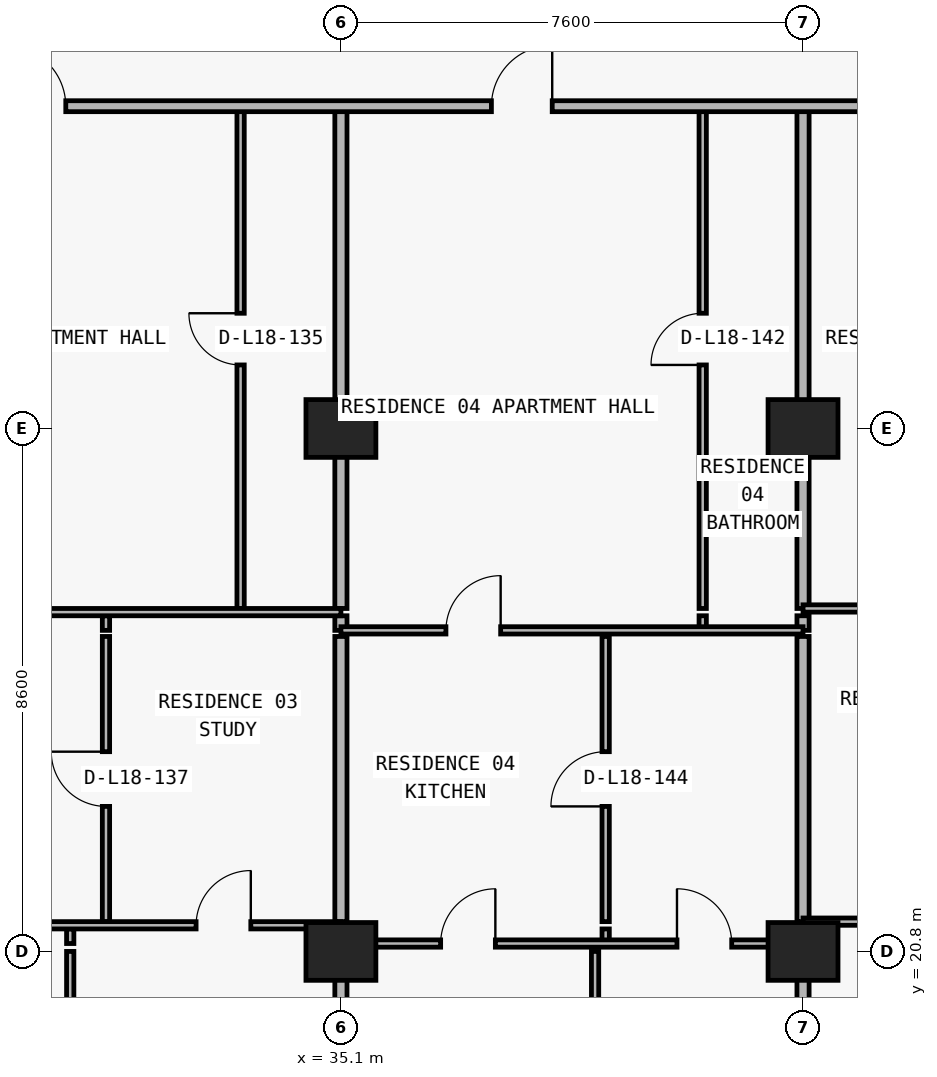
"""IFC4 building model, lengths in metres.
Left out: names, types, materials, properties, quantities, classifications, styles, units other than length and angle.
Written with IfcOpenShell. Run it as: python <this file> out.ifc"""

import sys

from ifc_helpers import new_model, si_unit, direction, frame, frame_2d, origin, origin_2d, place, context, subcontext, project, spatial, rectangle, extrude, element, fill, save


model = new_model("IFC4")
c1 = context("Model", 3, precision=1e-05, world=origin(), true_north=direction((0.0, 1.0)))
c2 = subcontext(c1, "Body", "Model", "MODEL_VIEW")
j1 = project(units=[si_unit("LENGTHUNIT", "METRE"), si_unit("PLANEANGLEUNIT", "RADIAN")], contexts=[c1])
p1 = place(None, origin())
s1 = spatial("IfcSite", under=j1, at=p1, CompositionType="ELEMENT")
p2 = place(p1, origin())
s2 = spatial("IfcBuilding", under=s1, at=p2, CompositionType="ELEMENT")
p3 = place(p2, frame((0.0, 0.0, 69.6)))
s3 = spatial("IfcBuildingStorey", under=s2, at=p3, CompositionType="ELEMENT", Elevation=69.6)
for number, where, z_axis, x_axis in (
    (1, (35.1, 20.8, 0.0), (0.0, 0.0, 1.0), (1.0, 0.0, 0.0)),
    (2, (42.7, 20.8, 0.0), (0.0, 0.0, 1.0), (1.0, 0.0, 0.0)),
    (3, (35.1, 29.4, 0.0), (0.0, 0.0, 1.0), (1.0, 0.0, 0.0)),
    (4, (42.7, 29.4, 0.0), (0.0, 0.0, 1.0), (1.0, 0.0, 0.0)),
):
    element("IfcColumn", number, at=place(p3, frame(where, z_axis=z_axis, x_axis=x_axis)), inside=s3, PredefinedType="COLUMN", context=c2, shape_type="SweptSolid", body=[
        extrude(rectangle(XDim=1.15, YDim=0.95, at=origin_2d()), origin(), (0.0, 0.0, 1.0), 3.05),
    ])
p4 = place(p3, frame((30.648, 6.24, 0.0), z_axis=(0.0, 0.0, 1.0), x_axis=(0.0, 1.0, 0.0)))
e5 = element("IfcWall", 5, at=p4, inside=s3, PredefinedType="PARTITIONING", context=c2, shape_type="SweptSolid", body=[
    extrude(rectangle(XDim=14.56, YDim=0.12, at=frame_2d((7.28, 0.0))), origin(), (0.0, 0.0, 1.0), 3.05),
])
p5 = place(p3, frame((30.648, 20.93, 0.0), z_axis=(0.0, 0.0, 1.0), x_axis=(0.0, 1.0, 0.0)))
e6 = element("IfcWall", 6, at=p5, inside=s3, PredefinedType="PARTITIONING", context=c2, shape_type="SweptSolid", body=[
    extrude(rectangle(XDim=0.24, YDim=0.12, at=frame_2d((0.12, 0.0))), origin(), (0.0, 0.0, 1.0), 3.05),
])
p6 = place(p3, frame((31.236, 21.29, 0.0), z_axis=(0.0, 0.0, 1.0), x_axis=(0.0, 1.0, 0.0)))
e7 = element("IfcWall", 7, at=p6, inside=s3, PredefinedType="PARTITIONING", context=c2, shape_type="SweptSolid", body=[
    extrude(rectangle(XDim=4.69, YDim=0.12, at=frame_2d((2.345, 0.0))), origin(), (0.0, 0.0, 1.0), 3.05),
])
p7 = place(p6, frame((1.895, 0.0, 0.0)))
e8 = element("IfcOpeningElement", 8, at=p7, cuts=e7, PredefinedType="OPENING", context=c2, shape_type="SweptSolid", body=[
    extrude(rectangle(XDim=0.9, YDim=2.15, at=frame_2d((0.45, 1.075))), frame((0.0, 0.07, 0.0), z_axis=(0.0, -1.0, 0.0), x_axis=(1.0, 0.0, 0.0)), (0.0, 0.0, 1.0), 0.14),
])
p8 = place(p3, frame((31.236, 26.08, 0.0), z_axis=(0.0, 0.0, 1.0), x_axis=(0.0, 1.0, 0.0)))
e9 = element("IfcWall", 9, at=p8, inside=s3, PredefinedType="PARTITIONING", context=c2, shape_type="SweptSolid", body=[
    extrude(rectangle(XDim=0.24, YDim=0.12, at=frame_2d((0.12, 0.0))), origin(), (0.0, 0.0, 1.0), 3.05),
])
p9 = place(p3, frame((33.45, 26.44, 0.0), z_axis=(0.0, 0.0, 1.0), x_axis=(0.0, 1.0, 0.0)))
e10 = element("IfcWall", 10, at=p9, inside=s3, PredefinedType="PARTITIONING", context=c2, shape_type="SweptSolid", body=[
    extrude(rectangle(XDim=8.26, YDim=0.12, at=frame_2d((4.13, 0.0))), origin(), (0.0, 0.0, 1.0), 3.05),
])
p10 = place(p9, frame((4.005, 0.0, 0.0)))
e11 = element("IfcOpeningElement", 11, at=p10, cuts=e10, PredefinedType="OPENING", context=c2, shape_type="SweptSolid", body=[
    extrude(rectangle(XDim=0.85, YDim=2.1, at=frame_2d((0.425, 1.05))), frame((0.0, 0.07, 0.0), z_axis=(0.0, -1.0, 0.0), x_axis=(1.0, 0.0, 0.0)), (0.0, 0.0, 1.0), 0.14),
])
p11 = place(p3, frame((35.1, 6.24, 0.0), z_axis=(0.0, 0.0, 1.0), x_axis=(0.0, 1.0, 0.0)))
e12 = element("IfcWall", 12, at=p11, inside=s3, PredefinedType="PARTITIONING", context=c2, shape_type="SweptSolid", body=[
    extrude(rectangle(XDim=14.56, YDim=0.2, at=frame_2d((7.28, 0.0))), origin(), (0.0, 0.0, 1.0), 2.11),
])
p12 = place(p3, frame((35.1, 20.93, 0.0), z_axis=(0.0, 0.0, 1.0), x_axis=(0.0, 1.0, 0.0)))
e13 = element("IfcWall", 13, at=p12, inside=s3, PredefinedType="PARTITIONING", context=c2, shape_type="SweptSolid", body=[
    extrude(rectangle(XDim=0.24, YDim=0.2, at=frame_2d((0.12, 0.0))), origin(), (0.0, 0.0, 1.0), 3.05),
])
p13 = place(p3, frame((35.1, 21.29, 0.0), z_axis=(0.0, 0.0, 1.0), x_axis=(0.0, 1.0, 0.0)))
e14 = element("IfcWall", 14, at=p13, inside=s3, PredefinedType="PARTITIONING", context=c2, shape_type="SweptSolid", body=[
    extrude(rectangle(XDim=4.69, YDim=0.2, at=frame_2d((2.345, 0.0))), origin(), (0.0, 0.0, 1.0), 2.11),
])
p14 = place(p3, frame((35.1, 26.08, 0.0), z_axis=(0.0, 0.0, 1.0), x_axis=(0.0, 1.0, 0.0)))
e15 = element("IfcWall", 15, at=p14, inside=s3, PredefinedType="PARTITIONING", context=c2, shape_type="SweptSolid", body=[
    extrude(rectangle(XDim=0.24, YDim=0.2, at=frame_2d((0.12, 0.0))), origin(), (0.0, 0.0, 1.0), 2.11),
])
p15 = place(p3, frame((35.1, 26.44, 0.0), z_axis=(0.0, 0.0, 1.0), x_axis=(0.0, 1.0, 0.0)))
e16 = element("IfcWall", 16, at=p15, inside=s3, PredefinedType="PARTITIONING", context=c2, shape_type="SweptSolid", body=[
    extrude(rectangle(XDim=8.26, YDim=0.2, at=frame_2d((4.13, 0.0))), origin(), (0.0, 0.0, 1.0), 2.11),
])
p16 = place(p3, frame((39.28, 6.24, 0.0), z_axis=(0.0, 0.0, 1.0), x_axis=(0.0, 1.0, 0.0)))
e17 = element("IfcWall", 17, at=p16, inside=s3, PredefinedType="PARTITIONING", context=c2, shape_type="SweptSolid", body=[
    extrude(rectangle(XDim=14.56, YDim=0.12, at=frame_2d((7.28, 0.0))), origin(), (0.0, 0.0, 1.0), 3.05),
])
p17 = place(p3, frame((39.454, 20.93, 0.0), z_axis=(0.0, 0.0, 1.0), x_axis=(0.0, 1.0, 0.0)))
e18 = element("IfcWall", 18, at=p17, inside=s3, PredefinedType="PARTITIONING", context=c2, shape_type="SweptSolid", body=[
    extrude(rectangle(XDim=0.24, YDim=0.12, at=frame_2d((0.12, 0.0))), origin(), (0.0, 0.0, 1.0), 3.05),
])
p18 = place(p3, frame((39.454, 21.29, 0.0), z_axis=(0.0, 0.0, 1.0), x_axis=(0.0, 1.0, 0.0)))
e19 = element("IfcWall", 19, at=p18, inside=s3, PredefinedType="PARTITIONING", context=c2, shape_type="SweptSolid", body=[
    extrude(rectangle(XDim=4.69, YDim=0.12, at=frame_2d((2.345, 0.0))), origin(), (0.0, 0.0, 1.0), 3.05),
])
p19 = place(p18, frame((1.895, 0.0, 0.0)))
e20 = element("IfcOpeningElement", 20, at=p19, cuts=e19, PredefinedType="OPENING", context=c2, shape_type="SweptSolid", body=[
    extrude(rectangle(XDim=0.9, YDim=2.15, at=frame_2d((0.45, 1.075))), frame((0.0, 0.07, 0.0), z_axis=(0.0, -1.0, 0.0), x_axis=(1.0, 0.0, 0.0)), (0.0, 0.0, 1.0), 0.14),
])
p20 = place(p3, frame((41.05, 26.08, 0.0), z_axis=(0.0, 0.0, 1.0), x_axis=(0.0, 1.0, 0.0)))
e21 = element("IfcWall", 21, at=p20, inside=s3, PredefinedType="PARTITIONING", context=c2, shape_type="SweptSolid", body=[
    extrude(rectangle(XDim=0.24, YDim=0.12, at=frame_2d((0.12, 0.0))), origin(), (0.0, 0.0, 1.0), 3.05),
])
p21 = place(p3, frame((41.05, 26.44, 0.0), z_axis=(0.0, 0.0, 1.0), x_axis=(0.0, 1.0, 0.0)))
e22 = element("IfcWall", 22, at=p21, inside=s3, PredefinedType="PARTITIONING", context=c2, shape_type="SweptSolid", body=[
    extrude(rectangle(XDim=8.26, YDim=0.12, at=frame_2d((4.13, 0.0))), origin(), (0.0, 0.0, 1.0), 3.05),
])
p22 = place(p21, frame((4.005, 0.0, 0.0)))
e23 = element("IfcOpeningElement", 23, at=p22, cuts=e22, PredefinedType="OPENING", context=c2, shape_type="SweptSolid", body=[
    extrude(rectangle(XDim=0.85, YDim=2.1, at=frame_2d((0.425, 1.05))), frame((0.0, 0.07, 0.0), z_axis=(0.0, -1.0, 0.0), x_axis=(1.0, 0.0, 0.0)), (0.0, 0.0, 1.0), 0.14),
])
p23 = place(p3, frame((42.7, 6.24, 0.0), z_axis=(0.0, 0.0, 1.0), x_axis=(0.0, 1.0, 0.0)))
e24 = element("IfcWall", 24, at=p23, inside=s3, PredefinedType="PARTITIONING", context=c2, shape_type="SweptSolid", body=[
    extrude(rectangle(XDim=14.56, YDim=0.2, at=frame_2d((7.28, 0.0))), origin(), (0.0, 0.0, 1.0), 2.11),
])
p24 = place(p3, frame((42.7, 20.93, 0.0), z_axis=(0.0, 0.0, 1.0), x_axis=(0.0, 1.0, 0.0)))
e25 = element("IfcWall", 25, at=p24, inside=s3, PredefinedType="PARTITIONING", context=c2, shape_type="SweptSolid", body=[
    extrude(rectangle(XDim=0.24, YDim=0.2, at=frame_2d((0.12, 0.0))), origin(), (0.0, 0.0, 1.0), 3.05),
])
p25 = place(p3, frame((42.7, 21.29, 0.0), z_axis=(0.0, 0.0, 1.0), x_axis=(0.0, 1.0, 0.0)))
e26 = element("IfcWall", 26, at=p25, inside=s3, PredefinedType="PARTITIONING", context=c2, shape_type="SweptSolid", body=[
    extrude(rectangle(XDim=4.69, YDim=0.2, at=frame_2d((2.345, 0.0))), origin(), (0.0, 0.0, 1.0), 2.11),
])
p26 = place(p3, frame((42.7, 26.08, 0.0), z_axis=(0.0, 0.0, 1.0), x_axis=(0.0, 1.0, 0.0)))
e27 = element("IfcWall", 27, at=p26, inside=s3, PredefinedType="PARTITIONING", context=c2, shape_type="SweptSolid", body=[
    extrude(rectangle(XDim=0.24, YDim=0.2, at=frame_2d((0.12, 0.0))), origin(), (0.0, 0.0, 1.0), 2.11),
])
p27 = place(p3, frame((42.7, 26.44, 0.0), z_axis=(0.0, 0.0, 1.0), x_axis=(0.0, 1.0, 0.0)))
e28 = element("IfcWall", 28, at=p27, inside=s3, PredefinedType="PARTITIONING", context=c2, shape_type="SweptSolid", body=[
    extrude(rectangle(XDim=8.26, YDim=0.2, at=frame_2d((4.13, 0.0))), origin(), (0.0, 0.0, 1.0), 2.11),
])
p28 = place(p3, frame((35.1, 20.93, 0.0), z_axis=(0.0, 0.0, 1.0), x_axis=(1.0, 0.0, 0.0)))
e29 = element("IfcWall", 29, at=p28, inside=s3, PredefinedType="PARTITIONING", context=c2, shape_type="SweptSolid", body=[
    extrude(rectangle(XDim=7.6, YDim=0.12, at=frame_2d((3.8, 0.0))), origin(), (0.0, 0.0, 1.0), 2.11),
])
p29 = place(p28, frame((1.64, 0.0, 0.0)))
e30 = element("IfcOpeningElement", 30, at=p29, cuts=e29, PredefinedType="OPENING", context=c2, shape_type="SweptSolid", body=[
    extrude(rectangle(XDim=0.9, YDim=2.06, at=frame_2d((0.45, 1.03))), frame((0.0, 0.07, 0.0), z_axis=(0.0, -1.0, 0.0), x_axis=(1.0, 0.0, 0.0)), (0.0, 0.0, 1.0), 0.14),
])
p30 = place(p28, frame((5.527, 0.0, 0.0)))
e31 = element("IfcOpeningElement", 31, at=p30, cuts=e29, PredefinedType="OPENING", context=c2, shape_type="SweptSolid", body=[
    extrude(rectangle(XDim=0.9, YDim=2.06, at=frame_2d((0.45, 1.03))), frame((0.0, 0.07, 0.0), z_axis=(0.0, -1.0, 0.0), x_axis=(1.0, 0.0, 0.0)), (0.0, 0.0, 1.0), 0.14),
])
p31 = place(p3, frame((26.97, 21.23, 0.0), z_axis=(0.0, 0.0, 1.0), x_axis=(1.0, 0.0, 0.0)))
e32 = element("IfcWall", 32, at=p31, inside=s3, PredefinedType="PARTITIONING", context=c2, shape_type="SweptSolid", body=[
    extrude(rectangle(XDim=8.13, YDim=0.12, at=frame_2d((4.065, 0.0))), origin(), (0.0, 0.0, 1.0), 3.05),
])
p32 = place(p31, frame((1.389, 0.0, 0.0)))
e33 = element("IfcOpeningElement", 33, at=p32, cuts=e32, PredefinedType="OPENING", context=c2, shape_type="SweptSolid", body=[
    extrude(rectangle(XDim=0.9, YDim=2.15, at=frame_2d((0.45, 1.075))), frame((0.0, 0.07, 0.0), z_axis=(0.0, -1.0, 0.0), x_axis=(1.0, 0.0, 0.0)), (0.0, 0.0, 1.0), 0.14),
])
p33 = place(p31, frame((5.748, 0.0, 0.0)))
e34 = element("IfcOpeningElement", 34, at=p33, cuts=e32, PredefinedType="OPENING", context=c2, shape_type="SweptSolid", body=[
    extrude(rectangle(XDim=0.9, YDim=2.15, at=frame_2d((0.45, 1.075))), frame((0.0, 0.07, 0.0), z_axis=(0.0, -1.0, 0.0), x_axis=(1.0, 0.0, 0.0)), (0.0, 0.0, 1.0), 0.14),
])
p34 = place(p3, frame((42.7, 21.29, 0.0), z_axis=(0.0, 0.0, 1.0), x_axis=(1.0, 0.0, 0.0)))
e35 = element("IfcWall", 35, at=p34, inside=s3, PredefinedType="PARTITIONING", context=c2, shape_type="SweptSolid", body=[
    extrude(rectangle(XDim=8.13, YDim=0.12, at=frame_2d((4.065, 0.0))), origin(), (0.0, 0.0, 1.0), 3.05),
])
p35 = place(p34, frame((1.524, 0.0, 0.0)))
e36 = element("IfcOpeningElement", 36, at=p35, cuts=e35, PredefinedType="OPENING", context=c2, shape_type="SweptSolid", body=[
    extrude(rectangle(XDim=0.9, YDim=2.15, at=frame_2d((0.45, 1.075))), frame((0.0, 0.07, 0.0), z_axis=(0.0, -1.0, 0.0), x_axis=(1.0, 0.0, 0.0)), (0.0, 0.0, 1.0), 0.14),
])
p36 = place(p34, frame((5.758, 0.0, 0.0)))
e37 = element("IfcOpeningElement", 37, at=p36, cuts=e35, PredefinedType="OPENING", context=c2, shape_type="SweptSolid", body=[
    extrude(rectangle(XDim=0.9, YDim=2.15, at=frame_2d((0.45, 1.075))), frame((0.0, 0.07, 0.0), z_axis=(0.0, -1.0, 0.0), x_axis=(1.0, 0.0, 0.0)), (0.0, 0.0, 1.0), 0.14),
])
p37 = place(p3, frame((35.1, 26.08, 0.0), z_axis=(0.0, 0.0, 1.0), x_axis=(1.0, 0.0, 0.0)))
e38 = element("IfcWall", 38, at=p37, inside=s3, PredefinedType="PARTITIONING", context=c2, shape_type="SweptSolid", body=[
    extrude(rectangle(XDim=7.6, YDim=0.12, at=frame_2d((3.8, 0.0))), origin(), (0.0, 0.0, 1.0), 3.05),
])
p38 = place(p37, frame((1.727, 0.0, 0.0)))
e39 = element("IfcOpeningElement", 39, at=p38, cuts=e38, PredefinedType="OPENING", context=c2, shape_type="SweptSolid", body=[
    extrude(rectangle(XDim=0.9, YDim=2.15, at=frame_2d((0.45, 1.075))), frame((0.0, 0.07, 0.0), z_axis=(0.0, -1.0, 0.0), x_axis=(1.0, 0.0, 0.0)), (0.0, 0.0, 1.0), 0.14),
])
p39 = place(p3, frame((26.97, 26.38, 0.0), z_axis=(0.0, 0.0, 1.0), x_axis=(1.0, 0.0, 0.0)))
e40 = element("IfcWall", 40, at=p39, inside=s3, PredefinedType="PARTITIONING", context=c2, shape_type="SweptSolid", body=[
    extrude(rectangle(XDim=8.13, YDim=0.12, at=frame_2d((4.065, 0.0))), origin(), (0.0, 0.0, 1.0), 3.05),
])
p40 = place(p39, frame((1.683, 0.0, 0.0)))
e41 = element("IfcOpeningElement", 41, at=p40, cuts=e40, PredefinedType="OPENING", context=c2, shape_type="SweptSolid", body=[
    extrude(rectangle(XDim=0.9, YDim=2.15, at=frame_2d((0.45, 1.075))), frame((0.0, 0.07, 0.0), z_axis=(0.0, -1.0, 0.0), x_axis=(1.0, 0.0, 0.0)), (0.0, 0.0, 1.0), 0.14),
])
p41 = place(p3, frame((42.7, 26.44, 0.0), z_axis=(0.0, 0.0, 1.0), x_axis=(1.0, 0.0, 0.0)))
e42 = element("IfcWall", 42, at=p41, inside=s3, PredefinedType="PARTITIONING", context=c2, shape_type="SweptSolid", body=[
    extrude(rectangle(XDim=8.13, YDim=0.12, at=frame_2d((4.065, 0.0))), origin(), (0.0, 0.0, 1.0), 3.05),
])
p42 = place(p41, frame((1.693, 0.0, 0.0)))
e43 = element("IfcOpeningElement", 43, at=p42, cuts=e42, PredefinedType="OPENING", context=c2, shape_type="SweptSolid", body=[
    extrude(rectangle(XDim=0.9, YDim=2.15, at=frame_2d((0.45, 1.075))), frame((0.0, 0.07, 0.0), z_axis=(0.0, -1.0, 0.0), x_axis=(1.0, 0.0, 0.0)), (0.0, 0.0, 1.0), 0.14),
])
p43 = place(p3, frame((5.105, 34.7, 0.0), z_axis=(0.0, 0.0, 1.0), x_axis=(1.0, 0.0, 0.0)))
e44 = element("IfcWall", 44, at=p43, inside=s3, PredefinedType="PARTITIONING", context=c2, shape_type="SweptSolid", body=[
    extrude(rectangle(XDim=67.595, YDim=0.18, at=frame_2d((33.797, 0.0))), origin(), (0.0, 0.0, 1.0), 3.05),
])
p44 = place(p43, frame((7.67, 0.0, 0.0)))
e45 = element("IfcOpeningElement", 45, at=p44, cuts=e44, PredefinedType="OPENING", context=c2, shape_type="SweptSolid", body=[
    extrude(rectangle(XDim=1.0, YDim=2.2, at=frame_2d((0.5, 1.1))), frame((0.0, 0.1, 0.0), z_axis=(0.0, -1.0, 0.0), x_axis=(1.0, 0.0, 0.0)), (0.0, 0.0, 1.0), 0.2),
])
p45 = place(p43, frame((16.07, 0.0, 0.0)))
e46 = element("IfcOpeningElement", 46, at=p45, cuts=e44, PredefinedType="OPENING", context=c2, shape_type="SweptSolid", body=[
    extrude(rectangle(XDim=1.0, YDim=2.2, at=frame_2d((0.5, 1.1))), frame((0.0, 0.1, 0.0), z_axis=(0.0, -1.0, 0.0), x_axis=(1.0, 0.0, 0.0)), (0.0, 0.0, 1.0), 0.2),
])
p46 = place(p43, frame((24.47, 0.0, 0.0)))
e47 = element("IfcOpeningElement", 47, at=p46, cuts=e44, PredefinedType="OPENING", context=c2, shape_type="SweptSolid", body=[
    extrude(rectangle(XDim=1.0, YDim=2.2, at=frame_2d((0.5, 1.1))), frame((0.0, 0.1, 0.0), z_axis=(0.0, -1.0, 0.0), x_axis=(1.0, 0.0, 0.0)), (0.0, 0.0, 1.0), 0.2),
])
p47 = place(p43, frame((32.47, 0.0, 0.0)))
e48 = element("IfcOpeningElement", 48, at=p47, cuts=e44, PredefinedType="OPENING", context=c2, shape_type="SweptSolid", body=[
    extrude(rectangle(XDim=1.0, YDim=2.2, at=frame_2d((0.5, 1.1))), frame((0.0, 0.1, 0.0), z_axis=(0.0, -1.0, 0.0), x_axis=(1.0, 0.0, 0.0)), (0.0, 0.0, 1.0), 0.2),
])
p48 = place(p43, frame((40.47, 0.0, 0.0)))
e49 = element("IfcOpeningElement", 49, at=p48, cuts=e44, PredefinedType="OPENING", context=c2, shape_type="SweptSolid", body=[
    extrude(rectangle(XDim=1.0, YDim=2.2, at=frame_2d((0.5, 1.1))), frame((0.0, 0.1, 0.0), z_axis=(0.0, -1.0, 0.0), x_axis=(1.0, 0.0, 0.0)), (0.0, 0.0, 1.0), 0.2),
])
p49 = place(p43, frame((48.87, 0.0, 0.0)))
e50 = element("IfcOpeningElement", 50, at=p49, cuts=e44, PredefinedType="OPENING", context=c2, shape_type="SweptSolid", body=[
    extrude(rectangle(XDim=1.0, YDim=2.2, at=frame_2d((0.5, 1.1))), frame((0.0, 0.1, 0.0), z_axis=(0.0, -1.0, 0.0), x_axis=(1.0, 0.0, 0.0)), (0.0, 0.0, 1.0), 0.2),
])
p50 = place(p43, frame((57.27, 0.0, 0.0)))
e51 = element("IfcOpeningElement", 51, at=p50, cuts=e44, PredefinedType="OPENING", context=c2, shape_type="SweptSolid", body=[
    extrude(rectangle(XDim=1.0, YDim=2.2, at=frame_2d((0.5, 1.1))), frame((0.0, 0.1, 0.0), z_axis=(0.0, -1.0, 0.0), x_axis=(1.0, 0.0, 0.0)), (0.0, 0.0, 1.0), 0.2),
])
p51 = place(p46, origin())
e52 = element("IfcDoor", 52, at=p51, inside=s3, OperationType="SINGLE_SWING_LEFT", PredefinedType="DOOR", context=c2, shape_type="SweptSolid", body=[
    extrude(rectangle(XDim=1.0, YDim=2.2, at=frame_2d((0.5, 1.1))), frame((0.0, 0.025, 0.0), z_axis=(0.0, -1.0, 0.0), x_axis=(1.0, 0.0, 0.0)), (0.0, 0.0, 1.0), 0.05),
])
fill(e47, e52)
p52 = place(p10, origin())
e53 = element("IfcDoor", 53, at=p52, inside=s3, OperationType="SINGLE_SWING_RIGHT", PredefinedType="DOOR", context=c2, shape_type="SweptSolid", body=[
    extrude(rectangle(XDim=0.85, YDim=2.1, at=frame_2d((0.425, 1.05))), frame((0.0, 0.025, 0.0), z_axis=(0.0, -1.0, 0.0), x_axis=(1.0, 0.0, 0.0)), (0.0, 0.0, 1.0), 0.05),
])
fill(e11, e53)
p53 = place(p7, origin())
e54 = element("IfcDoor", 54, at=p53, inside=s3, OperationType="SINGLE_SWING_RIGHT", PredefinedType="DOOR", context=c2, shape_type="SweptSolid", body=[
    extrude(rectangle(XDim=0.9, YDim=2.15, at=frame_2d((0.45, 1.075))), frame((0.0, 0.025, 0.0), z_axis=(0.0, -1.0, 0.0), x_axis=(1.0, 0.0, 0.0)), (0.0, 0.0, 1.0), 0.05),
])
fill(e8, e54)
p54 = place(p33, origin())
e55 = element("IfcDoor", 55, at=p54, inside=s3, OperationType="SINGLE_SWING_RIGHT", PredefinedType="DOOR", context=c2, shape_type="SweptSolid", body=[
    extrude(rectangle(XDim=0.9, YDim=2.15, at=frame_2d((0.45, 1.075))), frame((0.0, 0.025, 0.0), z_axis=(0.0, -1.0, 0.0), x_axis=(1.0, 0.0, 0.0)), (0.0, 0.0, 1.0), 0.05),
])
fill(e34, e55)
p55 = place(p47, origin())
e56 = element("IfcDoor", 56, at=p55, inside=s3, OperationType="SINGLE_SWING_RIGHT", PredefinedType="DOOR", context=c2, shape_type="SweptSolid", body=[
    extrude(rectangle(XDim=1.0, YDim=2.2, at=frame_2d((0.5, 1.1))), frame((0.0, 0.025, 0.0), z_axis=(0.0, -1.0, 0.0), x_axis=(1.0, 0.0, 0.0)), (0.0, 0.0, 1.0), 0.05),
])
fill(e48, e56)
p56 = place(p22, origin())
e57 = element("IfcDoor", 57, at=p56, inside=s3, OperationType="SINGLE_SWING_LEFT", PredefinedType="DOOR", context=c2, shape_type="SweptSolid", body=[
    extrude(rectangle(XDim=0.85, YDim=2.1, at=frame_2d((0.425, 1.05))), frame((0.0, 0.025, 0.0), z_axis=(0.0, -1.0, 0.0), x_axis=(1.0, 0.0, 0.0)), (0.0, 0.0, 1.0), 0.05),
])
fill(e23, e57)
p57 = place(p38, origin())
e58 = element("IfcDoor", 58, at=p57, inside=s3, OperationType="SINGLE_SWING_RIGHT", PredefinedType="DOOR", context=c2, shape_type="SweptSolid", body=[
    extrude(rectangle(XDim=0.9, YDim=2.15, at=frame_2d((0.45, 1.075))), frame((0.0, 0.025, 0.0), z_axis=(0.0, -1.0, 0.0), x_axis=(1.0, 0.0, 0.0)), (0.0, 0.0, 1.0), 0.05),
])
fill(e39, e58)
p58 = place(p19, origin())
e59 = element("IfcDoor", 59, at=p58, inside=s3, OperationType="SINGLE_SWING_LEFT", PredefinedType="DOOR", context=c2, shape_type="SweptSolid", body=[
    extrude(rectangle(XDim=0.9, YDim=2.15, at=frame_2d((0.45, 1.075))), frame((0.0, 0.025, 0.0), z_axis=(0.0, -1.0, 0.0), x_axis=(1.0, 0.0, 0.0)), (0.0, 0.0, 1.0), 0.05),
])
fill(e20, e59)
p59 = place(p29, origin())
e60 = element("IfcDoor", 60, at=p59, inside=s3, OperationType="SINGLE_SWING_RIGHT", PredefinedType="DOOR", context=c2, shape_type="SweptSolid", body=[
    extrude(rectangle(XDim=0.9, YDim=2.06, at=frame_2d((0.45, 1.03))), frame((0.0, 0.025, 0.0), z_axis=(0.0, -1.0, 0.0), x_axis=(1.0, 0.0, 0.0)), (0.0, 0.0, 1.0), 0.05),
])
fill(e30, e60)
p60 = place(p30, origin())
e61 = element("IfcDoor", 61, at=p60, inside=s3, OperationType="SINGLE_SWING_LEFT", PredefinedType="DOOR", context=c2, shape_type="SweptSolid", body=[
    extrude(rectangle(XDim=0.9, YDim=2.06, at=frame_2d((0.45, 1.03))), frame((0.0, 0.025, 0.0), z_axis=(0.0, -1.0, 0.0), x_axis=(1.0, 0.0, 0.0)), (0.0, 0.0, 1.0), 0.05),
])
fill(e31, e61)
save(model, sys.argv[1])
